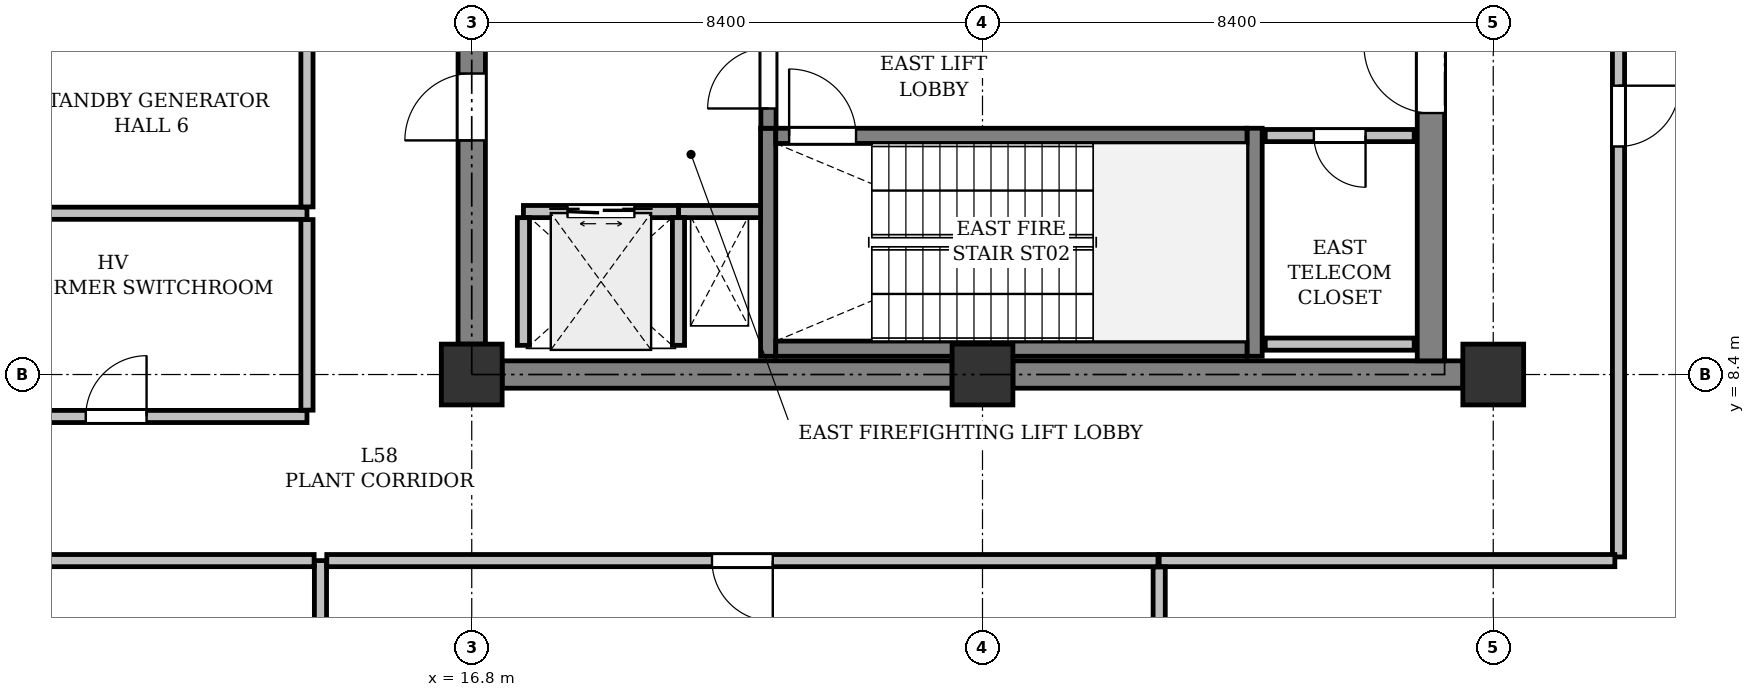
"""IFC4 building model, lengths in metres.
Left out: names, types, materials, properties, quantities, classifications, styles, units other than length and angle.
Written with IfcOpenShell. Run it as: python <this file> out.ifc"""

import sys

from ifc_helpers import new_model, si_unit, direction, frame, frame_2d, origin, origin_2d, place, context, subcontext, project, spatial, rectangle, extrude, element, fill, save


model = new_model("IFC4")
c1 = context("Model", 3, precision=1e-05, world=origin(), true_north=direction((0.0, 1.0)))
c2 = subcontext(c1, "Body", "Model", "MODEL_VIEW")
j1 = project(units=[si_unit("LENGTHUNIT", "METRE"), si_unit("PLANEANGLEUNIT", "RADIAN")], contexts=[c1])
p1 = place(None, origin())
s1 = spatial("IfcSite", under=j1, at=p1, CompositionType="ELEMENT")
p2 = place(p1, origin())
s2 = spatial("IfcBuilding", under=s1, at=p2, CompositionType="ELEMENT")
p3 = place(p2, frame((0.0, 0.0, 245.2)))
s3 = spatial("IfcBuildingStorey", under=s2, at=p3, CompositionType="ELEMENT", Elevation=245.2)
for number, where, z_axis, x_axis in (
    (1, (16.8, 8.4, 0.0), (0.0, 0.0, 1.0), (1.0, 0.0, 0.0)),
    (2, (25.2, 8.4, 0.0), (0.0, 0.0, 1.0), (1.0, 0.0, 0.0)),
    (3, (33.6, 8.4, 0.0), (0.0, 0.0, 1.0), (1.0, 0.0, 0.0)),
):
    element("IfcColumn", number, at=place(p3, frame(where, z_axis=z_axis, x_axis=x_axis)), inside=s3, PredefinedType="COLUMN", context=c2, shape_type="SweptSolid", body=[
        extrude(rectangle(XDim=1.0, YDim=1.0, at=origin_2d()), origin(), (0.0, 0.0, 1.0), 5.0),
    ])
p4 = place(p3, frame((17.3, 8.4, 0.0), z_axis=(0.0, 0.0, 1.0), x_axis=(1.0, 0.0, 0.0)))
e4 = element("IfcWall", 4, at=p4, inside=s3, PredefinedType="SHEAR", context=c2, shape_type="SweptSolid", body=[
    extrude(rectangle(XDim=7.4, YDim=0.45, at=frame_2d((3.7, 0.0))), origin(), (0.0, 0.0, 1.0), 4.725),
])
p5 = place(p3, frame((25.7, 8.4, 0.0), z_axis=(0.0, 0.0, 1.0), x_axis=(1.0, 0.0, 0.0)))
e5 = element("IfcWall", 5, at=p5, inside=s3, PredefinedType="SHEAR", context=c2, shape_type="SweptSolid", body=[
    extrude(rectangle(XDim=7.4, YDim=0.45, at=frame_2d((3.7, 0.0))), origin(), (0.0, 0.0, 1.0), 4.725),
])
p6 = place(p3, frame((32.575, 8.625, 0.0), z_axis=(0.0, 0.0, 1.0), x_axis=(0.0, 1.0, 0.0)))
e6 = element("IfcWall", 6, at=p6, inside=s3, PredefinedType="SHEAR", context=c2, shape_type="SweptSolid", body=[
    extrude(rectangle(XDim=7.95, YDim=0.45, at=frame_2d((3.975, 0.0))), origin(), (0.0, 0.0, 1.0), 4.725),
])
p7 = place(p6, frame((4.075, 0.0, 0.0)))
e7 = element("IfcOpeningElement", 7, at=p7, cuts=e6, PredefinedType="OPENING", context=c2, shape_type="SweptSolid", body=[
    extrude(rectangle(XDim=1.1, YDim=2.15, at=frame_2d((0.55, 1.075))), frame((0.0, 0.235, 0.0), z_axis=(0.0, -1.0, 0.0), x_axis=(1.0, 0.0, 0.0)), (0.0, 0.0, 1.0), 0.47),
])
p8 = place(p3, frame((16.8, 8.9, 0.0), z_axis=(0.0, 0.0, 1.0), x_axis=(0.0, 1.0, 0.0)))
e8 = element("IfcWall", 8, at=p8, inside=s3, PredefinedType="SHEAR", context=c2, shape_type="SweptSolid", body=[
    extrude(rectangle(XDim=7.4, YDim=0.45, at=frame_2d((3.7, 0.0))), origin(), (0.0, 0.0, 1.0), 4.725),
])
p9 = place(p8, frame((3.35, 0.0, 0.0)))
e9 = element("IfcOpeningElement", 9, at=p9, cuts=e8, PredefinedType="OPENING", context=c2, shape_type="SweptSolid", body=[
    extrude(rectangle(XDim=1.1, YDim=2.15, at=frame_2d((0.55, 1.075))), frame((0.0, 0.235, 0.0), z_axis=(0.0, -1.0, 0.0), x_axis=(1.0, 0.0, 0.0)), (0.0, 0.0, 1.0), 0.47),
])
for number, where, z_axis, x_axis in (
    (10, (21.675, 8.7, 0.0), (0.0, 0.0, 1.0), (0.0, 1.0, 0.0)),
    (11, (29.675, 8.7, 0.0), (0.0, 0.0, 1.0), (0.0, 1.0, 0.0)),
):
    element("IfcWall", number, at=place(p3, frame(where, z_axis=z_axis, x_axis=x_axis)), inside=s3, PredefinedType="SHEAR", context=c2, shape_type="SweptSolid", body=[
        extrude(rectangle(XDim=3.75, YDim=0.25, at=frame_2d((1.875, 0.0))), origin(), (0.0, 0.0, 1.0), 4.725),
    ])
p10 = place(p3, frame((21.8, 8.825, 0.0), z_axis=(0.0, 0.0, 1.0), x_axis=(1.0, 0.0, 0.0)))
e12 = element("IfcWall", 12, at=p10, inside=s3, PredefinedType="SHEAR", context=c2, shape_type="SweptSolid", body=[
    extrude(rectangle(XDim=7.75, YDim=0.25, at=frame_2d((3.875, 0.0))), origin(), (0.0, 0.0, 1.0), 4.725),
])
p11 = place(p3, frame((21.8, 12.325, 0.0), z_axis=(0.0, 0.0, 1.0), x_axis=(1.0, 0.0, 0.0)))
e13 = element("IfcWall", 13, at=p11, inside=s3, PredefinedType="SHEAR", context=c2, shape_type="SweptSolid", body=[
    extrude(rectangle(XDim=7.75, YDim=0.25, at=frame_2d((3.875, 0.0))), origin(), (0.0, 0.0, 1.0), 4.725),
])
p12 = place(p11, frame((0.22, 0.0, 0.0)))
e14 = element("IfcOpeningElement", 14, at=p12, cuts=e13, PredefinedType="OPENING", context=c2, shape_type="SweptSolid", body=[
    extrude(rectangle(XDim=1.1, YDim=2.15, at=frame_2d((0.55, 1.075))), frame((0.0, 0.135, 0.0), z_axis=(0.0, -1.0, 0.0), x_axis=(1.0, 0.0, 0.0)), (0.0, 0.0, 1.0), 0.27),
])
p13 = place(p3, frame((20.2, 11.08, 0.0), z_axis=(0.0, 0.0, 1.0), x_axis=(1.0, 0.0, 0.0)))
e15 = element("IfcWall", 15, at=p13, inside=s3, PredefinedType="PARTITIONING", context=c2, shape_type="SweptSolid", body=[
    extrude(rectangle(XDim=1.35, YDim=0.2, at=frame_2d((0.675, 0.0))), origin(), (0.0, 0.0, 1.0), 4.725),
])
p14 = place(p3, frame((21.68, 12.45, 0.0), z_axis=(0.0, 0.0, 1.0), x_axis=(0.0, 1.0, 0.0)))
e16 = element("IfcWall", 16, at=p14, inside=s3, PredefinedType="SHEAR", context=c2, shape_type="SweptSolid", body=[
    extrude(rectangle(XDim=1.65, YDim=0.25, at=frame_2d((0.825, 0.0))), origin(), (0.0, 0.0, 1.0), 4.725),
])
p15 = place(p14, frame((0.325, 0.0, 0.0)))
e17 = element("IfcOpeningElement", 17, at=p15, cuts=e16, PredefinedType="OPENING", context=c2, shape_type="SweptSolid", body=[
    extrude(rectangle(XDim=1.0, YDim=2.15, at=frame_2d((0.5, 1.075))), frame((0.0, 0.135, 0.0), z_axis=(0.0, -1.0, 0.0), x_axis=(1.0, 0.0, 0.0)), (0.0, 0.0, 1.0), 0.27),
])
p16 = place(p3, frame((17.65, 11.08, 0.0), z_axis=(0.0, 0.0, 1.0), x_axis=(1.0, 0.0, 0.0)))
e18 = element("IfcWall", 18, at=p16, inside=s3, PredefinedType="PARTITIONING", context=c2, shape_type="SweptSolid", body=[
    extrude(rectangle(XDim=2.55, YDim=0.2, at=frame_2d((1.275, 0.0))), origin(), (0.0, 0.0, 1.0), 4.725),
])
p17 = place(p16, frame((0.725, 0.0, 0.0)))
e19 = element("IfcOpeningElement", 19, at=p17, cuts=e18, PredefinedType="OPENING", context=c2, shape_type="SweptSolid", body=[
    extrude(rectangle(XDim=1.1, YDim=2.2, at=frame_2d((0.55, 1.1))), frame((0.0, 0.11, 0.0), z_axis=(0.0, -1.0, 0.0), x_axis=(1.0, 0.0, 0.0)), (0.0, 0.0, 1.0), 0.22),
])
for number, where, z_axis, x_axis in (
    (20, (20.2, 8.88, 0.0), (0.0, 0.0, 1.0), (0.0, 1.0, 0.0)),
    (21, (17.65, 8.88, 0.0), (0.0, 0.0, 1.0), (0.0, 1.0, 0.0)),
):
    element("IfcWall", number, at=place(p3, frame(where, z_axis=z_axis, x_axis=x_axis)), inside=s3, PredefinedType="PARTITIONING", context=c2, shape_type="SweptSolid", body=[
        extrude(rectangle(XDim=2.1, YDim=0.2, at=frame_2d((1.05, 0.0))), origin(), (0.0, 0.0, 1.0), 4.725),
    ])
p18 = place(p3, frame((32.3, 12.33, 0.0), z_axis=(0.0, 0.0, 1.0), x_axis=(-1.0, 0.0, 0.0)))
e22 = element("IfcWall", 22, at=p18, inside=s3, PredefinedType="PARTITIONING", context=c2, shape_type="SweptSolid", body=[
    extrude(rectangle(XDim=2.45, YDim=0.2, at=frame_2d((1.225, 0.0))), origin(), (0.0, 0.0, 1.0), 4.725),
])
p19 = place(p18, frame((0.8, 0.0, 0.0)))
e23 = element("IfcOpeningElement", 23, at=p19, cuts=e22, PredefinedType="OPENING", context=c2, shape_type="SweptSolid", body=[
    extrude(rectangle(XDim=0.85, YDim=2.15, at=frame_2d((0.425, 1.075))), frame((0.0, 0.11, 0.0), z_axis=(0.0, -1.0, 0.0), x_axis=(1.0, 0.0, 0.0)), (0.0, 0.0, 1.0), 0.22),
])
p20 = place(p3, frame((29.85, 8.9, 0.0), z_axis=(0.0, 0.0, 1.0), x_axis=(1.0, 0.0, 0.0)))
e24 = element("IfcWall", 24, at=p20, inside=s3, PredefinedType="PARTITIONING", context=c2, shape_type="SweptSolid", body=[
    extrude(rectangle(XDim=2.45, YDim=0.2, at=frame_2d((1.225, 0.0))), origin(), (0.0, 0.0, 1.0), 4.725),
])
p21 = place(p3, frame((14.312, 0.124, 0.0), z_axis=(0.0, 0.0, 1.0), x_axis=(0.0, 1.0, 0.0)))
e25 = element("IfcWall", 25, at=p21, inside=s3, PredefinedType="PARTITIONING", context=c2, shape_type="SweptSolid", body=[
    extrude(rectangle(XDim=5.216, YDim=0.2, at=frame_2d((2.608, 0.0))), origin(), (0.0, 0.0, 1.0), 4.725),
])
p22 = place(p3, frame((14.208, 5.34, 0.0), z_axis=(0.0, 0.0, 1.0), x_axis=(-1.0, 0.0, 0.0)))
e26 = element("IfcWall", 26, at=p22, inside=s3, PredefinedType="PARTITIONING", context=c2, shape_type="SweptSolid", body=[
    extrude(rectangle(XDim=8.808, YDim=0.2, at=frame_2d((4.404, 0.0))), origin(), (0.0, 0.0, 1.0), 3.709),
])
p23 = place(p3, frame((35.66, 19.9, 0.0), z_axis=(0.0, 0.0, 1.0), x_axis=(0.0, -1.0, 0.0)))
e27 = element("IfcWall", 27, at=p23, inside=s3, PredefinedType="PARTITIONING", context=c2, shape_type="SweptSolid", body=[
    extrude(rectangle(XDim=14.5, YDim=0.2, at=frame_2d((7.25, 0.0))), origin(), (0.0, 0.0, 1.0), 3.825),
])
p24 = place(p23, frame((6.75, 0.0, 0.0)))
e28 = element("IfcOpeningElement", 28, at=p24, cuts=e27, PredefinedType="OPENING", context=c2, shape_type="SweptSolid", body=[
    extrude(rectangle(XDim=1.0, YDim=2.15, at=frame_2d((0.5, 1.075))), frame((0.0, 0.11, 0.0), z_axis=(0.0, -1.0, 0.0), x_axis=(1.0, 0.0, 0.0)), (0.0, 0.0, 1.0), 0.22),
])
p25 = place(p3, frame((35.6, 5.34, 0.0), z_axis=(0.0, 0.0, 1.0), x_axis=(-1.0, 0.0, 0.0)))
e29 = element("IfcWall", 29, at=p25, inside=s3, PredefinedType="PARTITIONING", context=c2, shape_type="SweptSolid", body=[
    extrude(rectangle(XDim=7.494, YDim=0.2, at=frame_2d((3.747, 0.0))), origin(), (0.0, 0.0, 1.0), 3.709),
])
p26 = place(p3, frame((28.106, 5.236, 0.0), z_axis=(0.0, 0.0, 1.0), x_axis=(0.0, -1.0, 0.0)))
e30 = element("IfcWall", 30, at=p26, inside=s3, PredefinedType="PARTITIONING", context=c2, shape_type="SweptSolid", body=[
    extrude(rectangle(XDim=5.112, YDim=0.2, at=frame_2d((2.556, 0.0))), origin(), (0.0, 0.0, 1.0), 4.725),
])
p27 = place(p3, frame((28.086, 5.34, 0.0), z_axis=(0.0, 0.0, 1.0), x_axis=(-1.0, 0.0, 0.0)))
e31 = element("IfcWall", 31, at=p27, inside=s3, PredefinedType="PARTITIONING", context=c2, shape_type="SweptSolid", body=[
    extrude(rectangle(XDim=13.67, YDim=0.2, at=frame_2d((6.835, 0.0))), origin(), (0.0, 0.0, 1.0), 3.709),
])
p28 = place(p27, frame((6.335, 0.0, 0.0)))
e32 = element("IfcOpeningElement", 32, at=p28, cuts=e31, PredefinedType="OPENING", context=c2, shape_type="SweptSolid", body=[
    extrude(rectangle(XDim=1.0, YDim=2.15, at=frame_2d((0.5, 1.075))), frame((0.0, 0.11, 0.0), z_axis=(0.0, -1.0, 0.0), x_axis=(1.0, 0.0, 0.0)), (0.0, 0.0, 1.0), 0.22),
])
p29 = place(p3, frame((14.09, 11.052, 0.0), z_axis=(0.0, 0.0, 1.0), x_axis=(-1.0, 0.0, 0.0)))
e33 = element("IfcWall", 33, at=p29, inside=s3, PredefinedType="PARTITIONING", context=c2, shape_type="SweptSolid", body=[
    extrude(rectangle(XDim=6.38, YDim=0.2, at=frame_2d((3.19, 0.0))), origin(), (0.0, 0.0, 1.0), 3.709),
])
p30 = place(p3, frame((7.814, 7.71, 0.0), z_axis=(0.0, 0.0, 1.0), x_axis=(1.0, 0.0, 0.0)))
e34 = element("IfcWall", 34, at=p30, inside=s3, PredefinedType="PARTITIONING", context=c2, shape_type="SweptSolid", body=[
    extrude(rectangle(XDim=6.276, YDim=0.2, at=frame_2d((3.138, 0.0))), origin(), (0.0, 0.0, 1.0), 3.709),
])
p31 = place(p30, frame((2.638, 0.0, 0.0)))
e35 = element("IfcOpeningElement", 35, at=p31, cuts=e34, PredefinedType="OPENING", context=c2, shape_type="SweptSolid", body=[
    extrude(rectangle(XDim=1.0, YDim=2.15, at=frame_2d((0.5, 1.075))), frame((0.0, 0.11, 0.0), z_axis=(0.0, -1.0, 0.0), x_axis=(1.0, 0.0, 0.0)), (0.0, 0.0, 1.0), 0.22),
])
p32 = place(p3, frame((14.09, 7.814, 0.0), z_axis=(0.0, 0.0, 1.0), x_axis=(0.0, 1.0, 0.0)))
e36 = element("IfcWall", 36, at=p32, inside=s3, PredefinedType="PARTITIONING", context=c2, shape_type="SweptSolid", body=[
    extrude(rectangle(XDim=3.134, YDim=0.2, at=frame_2d((1.567, 0.0))), origin(), (0.0, 0.0, 1.0), 3.825),
])
p33 = place(p3, frame((14.09, 11.156, 0.0), z_axis=(0.0, 0.0, 1.0), x_axis=(0.0, 1.0, 0.0)))
e37 = element("IfcWall", 37, at=p33, inside=s3, PredefinedType="PARTITIONING", context=c2, shape_type="SweptSolid", body=[
    extrude(rectangle(XDim=3.036, YDim=0.2, at=frame_2d((1.518, 0.0))), origin(), (0.0, 0.0, 1.0), 4.725),
])
p34 = place(p7, origin())
e38 = element("IfcDoor", 38, at=p34, inside=s3, OperationType="SINGLE_SWING_RIGHT", PredefinedType="DOOR", context=c2, shape_type="SweptSolid", body=[
    extrude(rectangle(XDim=1.1, YDim=2.15, at=frame_2d((0.55, 1.075))), frame((0.0, 0.025, 0.0), z_axis=(0.0, -1.0, 0.0), x_axis=(1.0, 0.0, 0.0)), (0.0, 0.0, 1.0), 0.05),
])
fill(e7, e38)
p35 = place(p9, origin())
e39 = element("IfcDoor", 39, at=p35, inside=s3, OperationType="SINGLE_SWING_LEFT", PredefinedType="DOOR", context=c2, shape_type="SweptSolid", body=[
    extrude(rectangle(XDim=1.1, YDim=2.15, at=frame_2d((0.55, 1.075))), frame((0.0, 0.025, 0.0), z_axis=(0.0, -1.0, 0.0), x_axis=(1.0, 0.0, 0.0)), (0.0, 0.0, 1.0), 0.05),
])
fill(e9, e39)
p36 = place(p12, origin())
e40 = element("IfcDoor", 40, at=p36, inside=s3, OperationType="SINGLE_SWING_LEFT", PredefinedType="DOOR", context=c2, shape_type="SweptSolid", body=[
    extrude(rectangle(XDim=1.1, YDim=2.15, at=frame_2d((0.55, 1.075))), frame((0.0, 0.025, 0.0), z_axis=(0.0, -1.0, 0.0), x_axis=(1.0, 0.0, 0.0)), (0.0, 0.0, 1.0), 0.05),
])
fill(e14, e40)
p37 = place(p15, origin())
e41 = element("IfcDoor", 41, at=p37, inside=s3, OperationType="SINGLE_SWING_LEFT", PredefinedType="DOOR", context=c2, shape_type="SweptSolid", body=[
    extrude(rectangle(XDim=1.0, YDim=2.15, at=frame_2d((0.5, 1.075))), frame((0.0, 0.025, 0.0), z_axis=(0.0, -1.0, 0.0), x_axis=(1.0, 0.0, 0.0)), (0.0, 0.0, 1.0), 0.05),
])
fill(e17, e41)
p38 = place(p17, origin())
e42 = element("IfcDoor", 42, at=p38, inside=s3, OperationType="DOUBLE_DOOR_SLIDING", PredefinedType="DOOR", context=c2, shape_type="SweptSolid", body=[
    extrude(rectangle(XDim=1.1, YDim=2.2, at=frame_2d((0.55, 1.1))), frame((0.0, 0.025, 0.0), z_axis=(0.0, -1.0, 0.0), x_axis=(1.0, 0.0, 0.0)), (0.0, 0.0, 1.0), 0.05),
])
fill(e19, e42)
p39 = place(p19, origin())
e43 = element("IfcDoor", 43, at=p39, inside=s3, OperationType="SINGLE_SWING_LEFT", PredefinedType="DOOR", context=c2, shape_type="SweptSolid", body=[
    extrude(rectangle(XDim=0.85, YDim=2.15, at=frame_2d((0.425, 1.075))), frame((0.0, 0.025, 0.0), z_axis=(0.0, -1.0, 0.0), x_axis=(1.0, 0.0, 0.0)), (0.0, 0.0, 1.0), 0.05),
])
fill(e23, e43)
p40 = place(p24, origin())
e44 = element("IfcDoor", 44, at=p40, inside=s3, OperationType="SINGLE_SWING_LEFT", PredefinedType="DOOR", context=c2, shape_type="SweptSolid", body=[
    extrude(rectangle(XDim=1.0, YDim=2.15, at=frame_2d((0.5, 1.075))), frame((0.0, 0.025, 0.0), z_axis=(0.0, -1.0, 0.0), x_axis=(1.0, 0.0, 0.0)), (0.0, 0.0, 1.0), 0.05),
])
fill(e28, e44)
p41 = place(p28, origin())
e45 = element("IfcDoor", 45, at=p41, inside=s3, OperationType="SINGLE_SWING_LEFT", PredefinedType="DOOR", context=c2, shape_type="SweptSolid", body=[
    extrude(rectangle(XDim=1.0, YDim=2.15, at=frame_2d((0.5, 1.075))), frame((0.0, 0.025, 0.0), z_axis=(0.0, -1.0, 0.0), x_axis=(1.0, 0.0, 0.0)), (0.0, 0.0, 1.0), 0.05),
])
fill(e32, e45)
p42 = place(p31, origin())
e46 = element("IfcDoor", 46, at=p42, inside=s3, OperationType="SINGLE_SWING_RIGHT", PredefinedType="DOOR", context=c2, shape_type="SweptSolid", body=[
    extrude(rectangle(XDim=1.0, YDim=2.15, at=frame_2d((0.5, 1.075))), frame((0.0, 0.025, 0.0), z_axis=(0.0, -1.0, 0.0), x_axis=(1.0, 0.0, 0.0)), (0.0, 0.0, 1.0), 0.05),
])
fill(e35, e46)
save(model, sys.argv[1])
